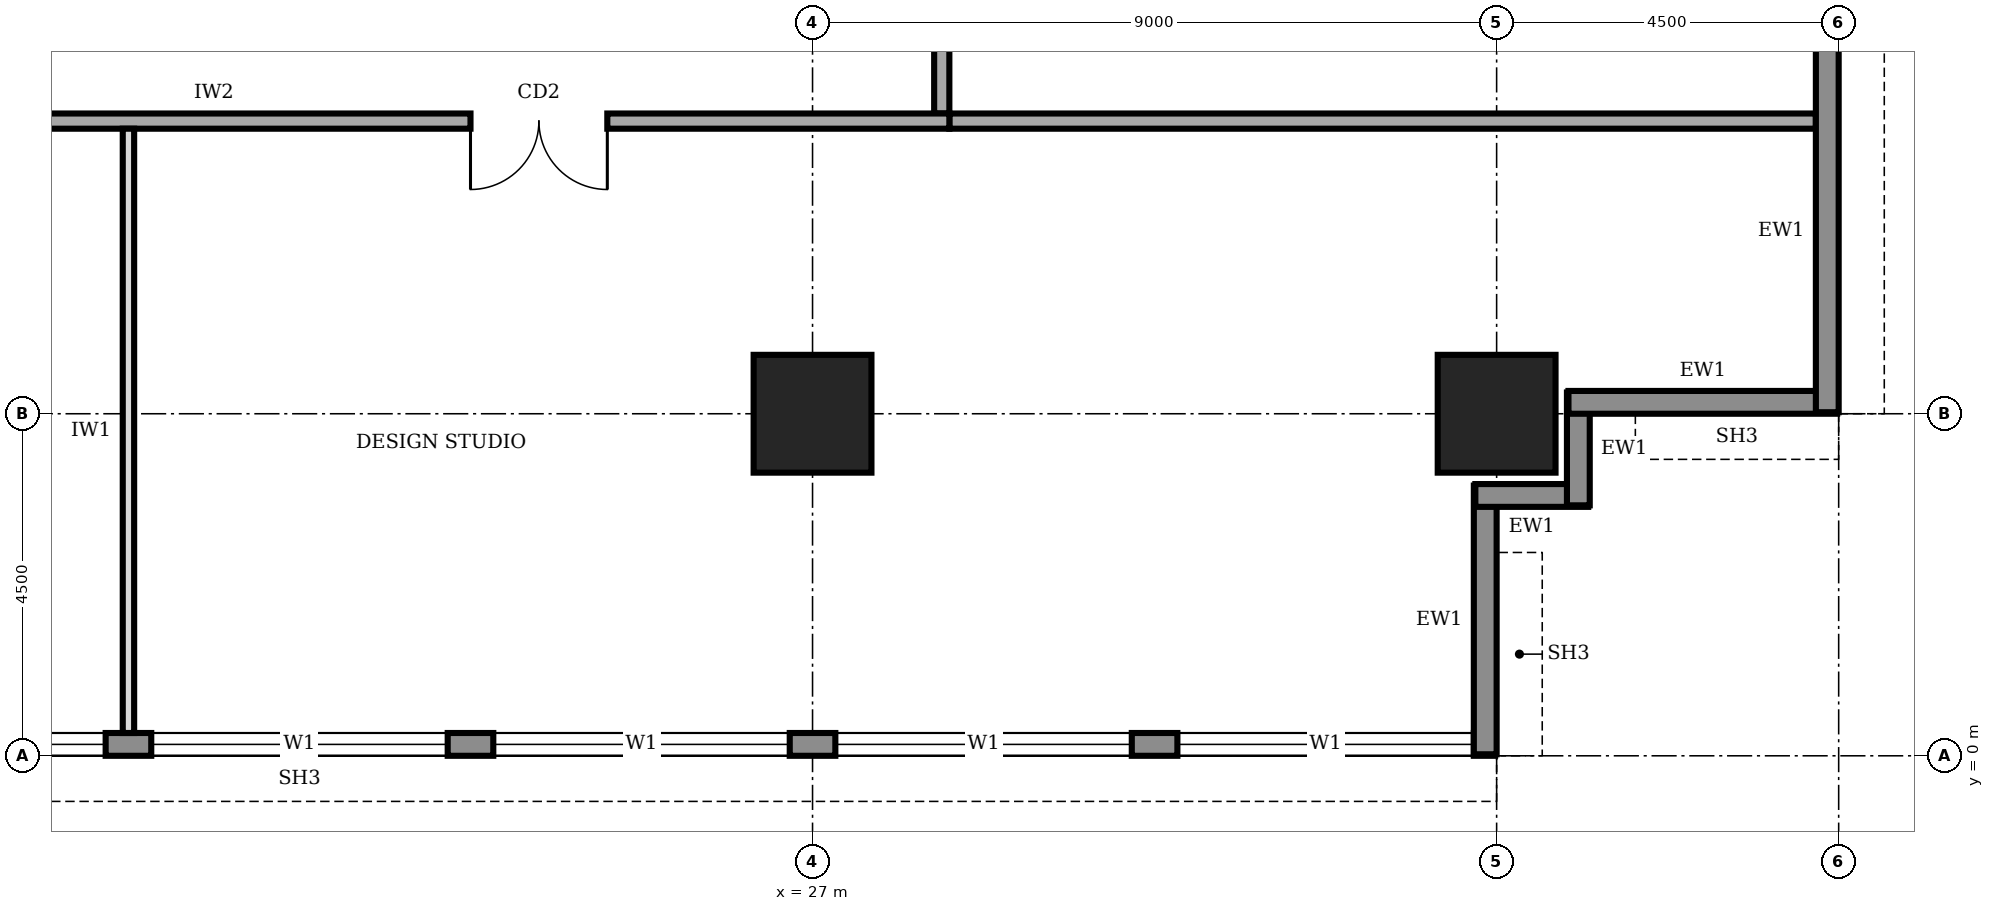
"""IFC4 building model, lengths in metres.
Left out: names, types, materials, properties, quantities, classifications, styles, units other than length and angle.
Written with IfcOpenShell. Run it as: python <this file> out.ifc"""

import sys

from ifc_helpers import new_model, si_unit, direction, frame, frame_2d, origin, origin_2d, place, context, subcontext, project, spatial, rectangle, extrude, element, fill, save


model = new_model("IFC4")
c1 = context("Model", 3, precision=1e-05, world=origin(), true_north=direction((0.0, 1.0)))
c2 = subcontext(c1, "Body", "Model", "MODEL_VIEW")
j1 = project(units=[si_unit("LENGTHUNIT", "METRE"), si_unit("PLANEANGLEUNIT", "RADIAN")], contexts=[c1])
p1 = place(None, origin())
s1 = spatial("IfcSite", under=j1, at=p1, CompositionType="ELEMENT")
p2 = place(p1, origin())
s2 = spatial("IfcBuilding", under=s1, at=p2, CompositionType="ELEMENT")
p3 = place(p2, frame((0.0, 0.0, 225.0)))
s3 = spatial("IfcBuildingStorey", under=s2, at=p3, CompositionType="ELEMENT", Elevation=225.0)
for number, where, z_axis, x_axis in (
    (1, (27.0, 4.5, 0.0), (0.0, 0.0, 1.0), (1.0, 0.0, 0.0)),
    (2, (36.0, 4.5, 0.0), (0.0, 0.0, 1.0), (1.0, 0.0, 0.0)),
):
    element("IfcColumn", number, at=place(p3, frame(where, z_axis=z_axis, x_axis=x_axis)), inside=s3, PredefinedType="COLUMN", context=c2, shape_type="SweptSolid", body=[
        extrude(rectangle(XDim=1.55, YDim=1.55, at=origin_2d()), origin(), (0.0, 0.0, 1.0), 4.0),
    ])
p4 = place(p3, frame((4.52, 0.15, 0.0), z_axis=(0.0, 0.0, 1.0), x_axis=(1.0, 0.0, 0.0)))
e3 = element("IfcWall", 3, at=p4, inside=s3, PredefinedType="STANDARD", context=c2, shape_type="SweptSolid", body=[
    extrude(rectangle(XDim=31.46, YDim=0.3, at=frame_2d((15.73, 0.0))), origin(), (0.0, 0.0, 1.0), 3.75),
])
p5 = place(p4, frame((4.78, 0.0, 0.9)))
e4 = element("IfcOpeningElement", 4, at=p5, cuts=e3, PredefinedType="OPENING", context=c2, shape_type="SweptSolid", body=[
    extrude(rectangle(XDim=3.9, YDim=2.2, at=frame_2d((1.95, 1.1))), frame((0.0, 0.16, 0.0), z_axis=(0.0, -1.0, 0.0), x_axis=(1.0, 0.0, 0.0)), (0.0, 0.0, 1.0), 0.32),
])
p6 = place(p4, frame((9.28, 0.0, 0.9)))
e5 = element("IfcOpeningElement", 5, at=p6, cuts=e3, PredefinedType="OPENING", context=c2, shape_type="SweptSolid", body=[
    extrude(rectangle(XDim=3.9, YDim=2.2, at=frame_2d((1.95, 1.1))), frame((0.0, 0.16, 0.0), z_axis=(0.0, -1.0, 0.0), x_axis=(1.0, 0.0, 0.0)), (0.0, 0.0, 1.0), 0.32),
])
p7 = place(p4, frame((13.78, 0.0, 0.9)))
e6 = element("IfcOpeningElement", 6, at=p7, cuts=e3, PredefinedType="OPENING", context=c2, shape_type="SweptSolid", body=[
    extrude(rectangle(XDim=3.9, YDim=2.2, at=frame_2d((1.95, 1.1))), frame((0.0, 0.16, 0.0), z_axis=(0.0, -1.0, 0.0), x_axis=(1.0, 0.0, 0.0)), (0.0, 0.0, 1.0), 0.32),
])
p8 = place(p4, frame((18.28, 0.0, 0.9)))
e7 = element("IfcOpeningElement", 7, at=p8, cuts=e3, PredefinedType="OPENING", context=c2, shape_type="SweptSolid", body=[
    extrude(rectangle(XDim=3.9, YDim=2.2, at=frame_2d((1.95, 1.1))), frame((0.0, 0.16, 0.0), z_axis=(0.0, -1.0, 0.0), x_axis=(1.0, 0.0, 0.0)), (0.0, 0.0, 1.0), 0.32),
])
p9 = place(p4, frame((22.78, 0.0, 0.9)))
e8 = element("IfcOpeningElement", 8, at=p9, cuts=e3, PredefinedType="OPENING", context=c2, shape_type="SweptSolid", body=[
    extrude(rectangle(XDim=3.9, YDim=2.2, at=frame_2d((1.95, 1.1))), frame((0.0, 0.16, 0.0), z_axis=(0.0, -1.0, 0.0), x_axis=(1.0, 0.0, 0.0)), (0.0, 0.0, 1.0), 0.32),
])
p10 = place(p4, frame((27.28, 0.0, 0.9)))
e9 = element("IfcOpeningElement", 9, at=p10, cuts=e3, PredefinedType="OPENING", context=c2, shape_type="SweptSolid", body=[
    extrude(rectangle(XDim=3.9, YDim=2.2, at=frame_2d((1.95, 1.1))), frame((0.0, 0.16, 0.0), z_axis=(0.0, -1.0, 0.0), x_axis=(1.0, 0.0, 0.0)), (0.0, 0.0, 1.0), 0.32),
])
p11 = place(p3, frame((35.85, 0.02, 0.0), z_axis=(0.0, 0.0, 1.0), x_axis=(0.0, 1.0, 0.0)))
e10 = element("IfcWall", 10, at=p11, inside=s3, PredefinedType="STANDARD", context=c2, shape_type="SweptSolid", body=[
    extrude(rectangle(XDim=3.535, YDim=0.3, at=frame_2d((1.768, 0.0))), origin(), (0.0, 0.0, 1.0), 2.65),
])
for number, where, z_axis, x_axis in (
    (11, (35.72, 3.425, 0.0), (0.0, 0.0, 1.0), (1.0, 0.0, 0.0)),
    (12, (37.075, 3.295, 0.0), (0.0, 0.0, 1.0), (0.0, 1.0, 0.0)),
):
    element("IfcWall", number, at=place(p3, frame(where, z_axis=z_axis, x_axis=x_axis)), inside=s3, PredefinedType="STANDARD", context=c2, shape_type="SweptSolid", body=[
        extrude(rectangle(XDim=1.485, YDim=0.3, at=frame_2d((0.743, 0.0))), origin(), (0.0, 0.0, 1.0), 3.75),
    ])
p12 = place(p3, frame((36.945, 4.65, 0.0), z_axis=(0.0, 0.0, 1.0), x_axis=(1.0, 0.0, 0.0)))
e13 = element("IfcWall", 13, at=p12, inside=s3, PredefinedType="STANDARD", context=c2, shape_type="SweptSolid", body=[
    extrude(rectangle(XDim=3.535, YDim=0.3, at=frame_2d((1.768, 0.0))), origin(), (0.0, 0.0, 1.0), 2.65),
])
p13 = place(p3, frame((40.35, 4.52, 0.0), z_axis=(0.0, 0.0, 1.0), x_axis=(0.0, 1.0, 0.0)))
e14 = element("IfcWall", 14, at=p13, inside=s3, PredefinedType="STANDARD", context=c2, shape_type="SweptSolid", body=[
    extrude(rectangle(XDim=31.46, YDim=0.3, at=frame_2d((15.73, 0.0))), origin(), (0.0, 0.0, 1.0), 3.75),
])
p14 = place(p13, frame((4.78, 0.0, 0.9)))
e15 = element("IfcOpeningElement", 15, at=p14, cuts=e14, PredefinedType="OPENING", context=c2, shape_type="SweptSolid", body=[
    extrude(rectangle(XDim=3.9, YDim=2.2, at=frame_2d((1.95, 1.1))), frame((0.0, 0.16, 0.0), z_axis=(0.0, -1.0, 0.0), x_axis=(1.0, 0.0, 0.0)), (0.0, 0.0, 1.0), 0.32),
])
p15 = place(p13, frame((9.28, 0.0, 0.9)))
e16 = element("IfcOpeningElement", 16, at=p15, cuts=e14, PredefinedType="OPENING", context=c2, shape_type="SweptSolid", body=[
    extrude(rectangle(XDim=3.9, YDim=2.2, at=frame_2d((1.95, 1.1))), frame((0.0, 0.16, 0.0), z_axis=(0.0, -1.0, 0.0), x_axis=(1.0, 0.0, 0.0)), (0.0, 0.0, 1.0), 0.32),
])
p16 = place(p13, frame((13.78, 0.0, 0.9)))
e17 = element("IfcOpeningElement", 17, at=p16, cuts=e14, PredefinedType="OPENING", context=c2, shape_type="SweptSolid", body=[
    extrude(rectangle(XDim=3.9, YDim=2.2, at=frame_2d((1.95, 1.1))), frame((0.0, 0.16, 0.0), z_axis=(0.0, -1.0, 0.0), x_axis=(1.0, 0.0, 0.0)), (0.0, 0.0, 1.0), 0.32),
])
p17 = place(p13, frame((18.28, 0.0, 0.9)))
e18 = element("IfcOpeningElement", 18, at=p17, cuts=e14, PredefinedType="OPENING", context=c2, shape_type="SweptSolid", body=[
    extrude(rectangle(XDim=3.9, YDim=2.2, at=frame_2d((1.95, 1.1))), frame((0.0, 0.16, 0.0), z_axis=(0.0, -1.0, 0.0), x_axis=(1.0, 0.0, 0.0)), (0.0, 0.0, 1.0), 0.32),
])
p18 = place(p13, frame((22.78, 0.0, 0.9)))
e19 = element("IfcOpeningElement", 19, at=p18, cuts=e14, PredefinedType="OPENING", context=c2, shape_type="SweptSolid", body=[
    extrude(rectangle(XDim=3.9, YDim=2.2, at=frame_2d((1.95, 1.1))), frame((0.0, 0.16, 0.0), z_axis=(0.0, -1.0, 0.0), x_axis=(1.0, 0.0, 0.0)), (0.0, 0.0, 1.0), 0.32),
])
p19 = place(p13, frame((27.28, 0.0, 0.9)))
e20 = element("IfcOpeningElement", 20, at=p19, cuts=e14, PredefinedType="OPENING", context=c2, shape_type="SweptSolid", body=[
    extrude(rectangle(XDim=3.9, YDim=2.2, at=frame_2d((1.95, 1.1))), frame((0.0, 0.16, 0.0), z_axis=(0.0, -1.0, 0.0), x_axis=(1.0, 0.0, 0.0)), (0.0, 0.0, 1.0), 0.32),
])
p20 = place(p3, frame((11.9, 8.35, 0.0), z_axis=(0.0, 0.0, 1.0), x_axis=(1.0, 0.0, 0.0)))
e21 = element("IfcWall", 21, at=p20, inside=s3, PredefinedType="SOLIDWALL", context=c2, shape_type="SweptSolid", body=[
    extrude(rectangle(XDim=16.9, YDim=0.2, at=frame_2d((8.45, 0.0))), origin(), (0.0, 0.0, 1.0), 3.75),
])
p21 = place(p20, frame((2.05, 0.0, 0.0)))
e22 = element("IfcOpeningElement", 22, at=p21, cuts=e21, PredefinedType="OPENING", context=c2, shape_type="SweptSolid", body=[
    extrude(rectangle(XDim=1.8, YDim=2.1, at=frame_2d((0.9, 1.05))), frame((0.0, 0.11, 0.0), z_axis=(0.0, -1.0, 0.0), x_axis=(1.0, 0.0, 0.0)), (0.0, 0.0, 1.0), 0.22),
])
p22 = place(p20, frame((10.6, 0.0, 0.0)))
e23 = element("IfcOpeningElement", 23, at=p22, cuts=e21, PredefinedType="OPENING", context=c2, shape_type="SweptSolid", body=[
    extrude(rectangle(XDim=1.8, YDim=2.1, at=frame_2d((0.9, 1.05))), frame((0.0, 0.11, 0.0), z_axis=(0.0, -1.0, 0.0), x_axis=(1.0, 0.0, 0.0)), (0.0, 0.0, 1.0), 0.22),
])
p23 = place(p3, frame((28.7, 8.45, 0.0), z_axis=(0.0, 0.0, 1.0), x_axis=(0.0, 1.0, 0.0)))
e24 = element("IfcWall", 24, at=p23, inside=s3, PredefinedType="SOLIDWALL", context=c2, shape_type="SweptSolid", body=[
    extrude(rectangle(XDim=23.8, YDim=0.2, at=frame_2d((11.9, 0.0))), origin(), (0.0, 0.0, 1.0), 3.75),
])
p24 = place(p23, frame((3.775, 0.0, 0.0)))
e25 = element("IfcOpeningElement", 25, at=p24, cuts=e24, PredefinedType="OPENING", context=c2, shape_type="SweptSolid", body=[
    extrude(rectangle(XDim=1.8, YDim=2.1, at=frame_2d((0.9, 1.05))), frame((0.0, 0.11, 0.0), z_axis=(0.0, -1.0, 0.0), x_axis=(1.0, 0.0, 0.0)), (0.0, 0.0, 1.0), 0.22),
])
p25 = place(p23, frame((11.3, 0.0, 0.0)))
e26 = element("IfcOpeningElement", 26, at=p25, cuts=e24, PredefinedType="OPENING", context=c2, shape_type="SweptSolid", body=[
    extrude(rectangle(XDim=1.0, YDim=2.1, at=frame_2d((0.5, 1.05))), frame((0.0, 0.11, 0.0), z_axis=(0.0, -1.0, 0.0), x_axis=(1.0, 0.0, 0.0)), (0.0, 0.0, 1.0), 0.22),
])
p26 = place(p23, frame((18.025, 0.0, 0.0)))
e27 = element("IfcOpeningElement", 27, at=p26, cuts=e24, PredefinedType="OPENING", context=c2, shape_type="SweptSolid", body=[
    extrude(rectangle(XDim=1.8, YDim=2.1, at=frame_2d((0.9, 1.05))), frame((0.0, 0.11, 0.0), z_axis=(0.0, -1.0, 0.0), x_axis=(1.0, 0.0, 0.0)), (0.0, 0.0, 1.0), 0.22),
])
p27 = place(p3, frame((28.8, 8.35, 0.0), z_axis=(0.0, 0.0, 1.0), x_axis=(1.0, 0.0, 0.0)))
e28 = element("IfcWall", 28, at=p27, inside=s3, PredefinedType="SOLIDWALL", context=c2, shape_type="SweptSolid", body=[
    extrude(rectangle(XDim=11.4, YDim=0.2, at=frame_2d((5.7, 0.0))), origin(), (0.0, 0.0, 1.0), 3.75),
])
p28 = place(p3, frame((18.0, 0.3, 0.0), z_axis=(0.0, 0.0, 1.0), x_axis=(0.0, 1.0, 0.0)))
e29 = element("IfcWall", 29, at=p28, inside=s3, PredefinedType="PARTITIONING", context=c2, shape_type="SweptSolid", body=[
    extrude(rectangle(XDim=7.95, YDim=0.15, at=frame_2d((3.975, 0.0))), origin(), (0.0, 0.0, 1.0), 3.75),
])
p29 = place(p6, origin())
e30 = element("IfcWindow", 30, at=p29, inside=s3, PartitioningType="SINGLE_PANEL", PredefinedType="WINDOW", context=c2, shape_type="SweptSolid", body=[
    extrude(rectangle(XDim=3.9, YDim=2.2, at=frame_2d((1.95, 1.1))), frame((0.0, 0.03, 0.0), z_axis=(0.0, -1.0, 0.0), x_axis=(1.0, 0.0, 0.0)), (0.0, 0.0, 1.0), 0.06),
])
fill(e5, e30)
p30 = place(p7, origin())
e31 = element("IfcWindow", 31, at=p30, inside=s3, PartitioningType="SINGLE_PANEL", PredefinedType="WINDOW", context=c2, shape_type="SweptSolid", body=[
    extrude(rectangle(XDim=3.9, YDim=2.2, at=frame_2d((1.95, 1.1))), frame((0.0, 0.03, 0.0), z_axis=(0.0, -1.0, 0.0), x_axis=(1.0, 0.0, 0.0)), (0.0, 0.0, 1.0), 0.06),
])
fill(e6, e31)
p31 = place(p8, origin())
e32 = element("IfcWindow", 32, at=p31, inside=s3, PartitioningType="SINGLE_PANEL", PredefinedType="WINDOW", context=c2, shape_type="SweptSolid", body=[
    extrude(rectangle(XDim=3.9, YDim=2.2, at=frame_2d((1.95, 1.1))), frame((0.0, 0.03, 0.0), z_axis=(0.0, -1.0, 0.0), x_axis=(1.0, 0.0, 0.0)), (0.0, 0.0, 1.0), 0.06),
])
fill(e7, e32)
p32 = place(p9, origin())
e33 = element("IfcWindow", 33, at=p32, inside=s3, PartitioningType="SINGLE_PANEL", PredefinedType="WINDOW", context=c2, shape_type="SweptSolid", body=[
    extrude(rectangle(XDim=3.9, YDim=2.2, at=frame_2d((1.95, 1.1))), frame((0.0, 0.03, 0.0), z_axis=(0.0, -1.0, 0.0), x_axis=(1.0, 0.0, 0.0)), (0.0, 0.0, 1.0), 0.06),
])
fill(e8, e33)
p33 = place(p10, origin())
e34 = element("IfcWindow", 34, at=p33, inside=s3, PartitioningType="SINGLE_PANEL", PredefinedType="WINDOW", context=c2, shape_type="SweptSolid", body=[
    extrude(rectangle(XDim=3.9, YDim=2.2, at=frame_2d((1.95, 1.1))), frame((0.0, 0.03, 0.0), z_axis=(0.0, -1.0, 0.0), x_axis=(1.0, 0.0, 0.0)), (0.0, 0.0, 1.0), 0.06),
])
fill(e9, e34)
p34 = place(p22, frame((1.8, 0.0, 0.0), z_axis=(0.0, 0.0, 1.0), x_axis=(-1.0, 0.0, 0.0)))
e35 = element("IfcDoor", 35, at=p34, inside=s3, OperationType="DOUBLE_DOOR_SINGLE_SWING", PredefinedType="DOOR", context=c2, shape_type="SweptSolid", body=[
    extrude(rectangle(XDim=1.8, YDim=2.1, at=frame_2d((0.9, 1.05))), frame((0.0, 0.025, 0.0), z_axis=(0.0, -1.0, 0.0), x_axis=(1.0, 0.0, 0.0)), (0.0, 0.0, 1.0), 0.05),
])
fill(e23, e35)
save(model, sys.argv[1])
